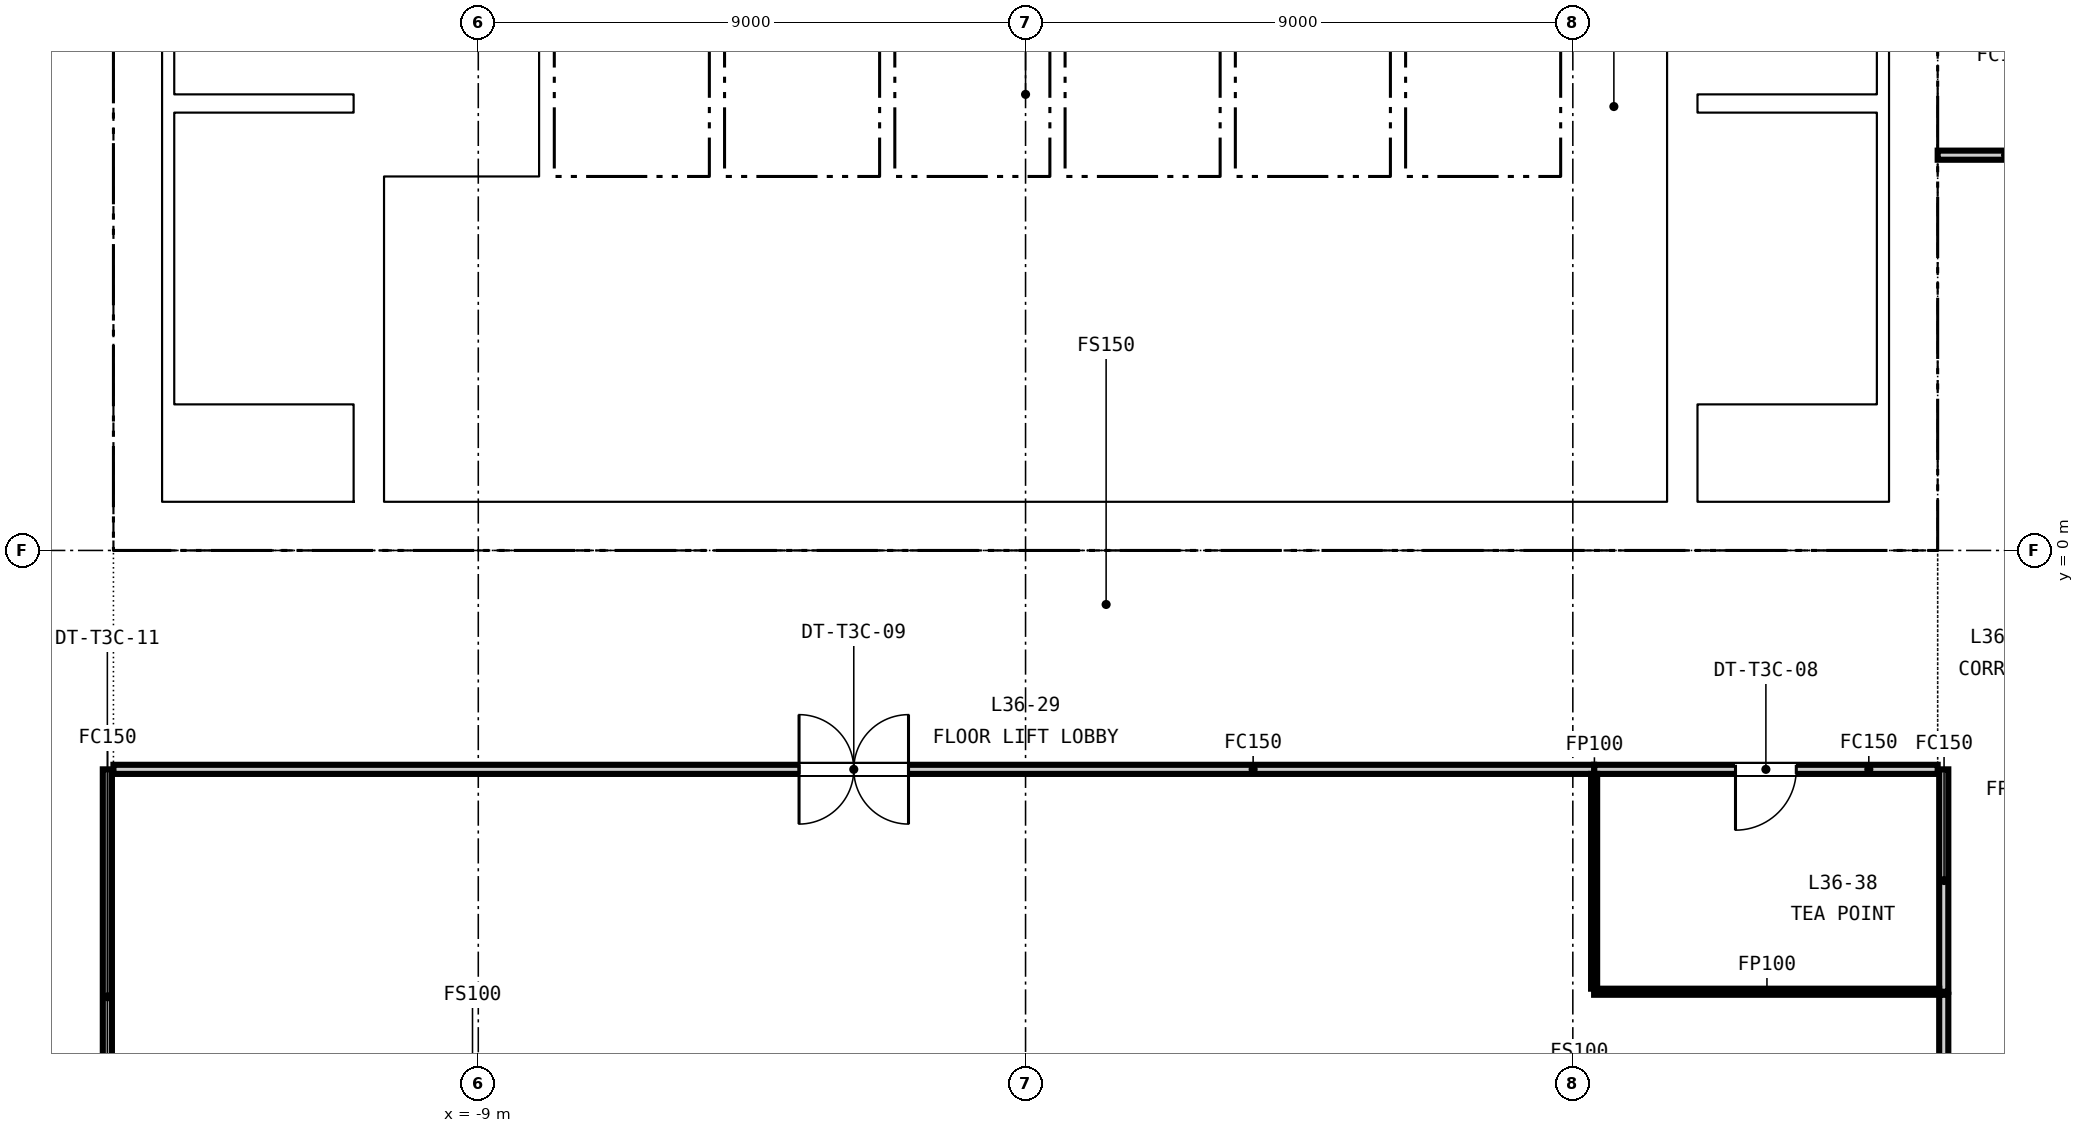
"""IFC4 building model, lengths in metres.
Left out: names, types, materials, properties, quantities, classifications, styles, units other than length and angle.
Written with IfcOpenShell. Run it as: python <this file> out.ifc"""

import sys

from ifc_helpers import new_model, si_unit, direction, frame, frame_2d, origin, place, context, subcontext, project, spatial, rectangle, extrude, element, fill, save


model = new_model("IFC4")
c1 = context("Model", 3, precision=1e-05, world=origin(), true_north=direction((0.0, 1.0)))
c2 = subcontext(c1, "Body", "Model", "MODEL_VIEW")
j1 = project(units=[si_unit("LENGTHUNIT", "METRE"), si_unit("PLANEANGLEUNIT", "RADIAN")], contexts=[c1])
p1 = place(None, origin())
s1 = spatial("IfcSite", under=j1, at=p1, CompositionType="ELEMENT")
p2 = place(p1, origin())
s2 = spatial("IfcBuilding", under=s1, at=p2, CompositionType="ELEMENT")
p3 = place(p2, frame((0.0, 0.0, 148.05)))
s3 = spatial("IfcBuildingStorey", under=s2, at=p3, CompositionType="ELEMENT", Elevation=148.05)
p4 = place(p3, frame((-15.0, 0.4, -0.15), z_axis=(0.0, 0.0, 1.0), x_axis=(1.0, 0.0, 0.0)))
e1 = element("IfcWall", 1, at=p4, inside=s3, PredefinedType="SOLIDWALL", context=c2, shape_type="SweptSolid", body=[
    extrude(rectangle(XDim=30.0, YDim=0.8, at=frame_2d((15.0, 0.0))), origin(), (0.0, 0.0, 1.0), 3.65),
])
p5 = place(p4, frame((5.8, 0.0, 0.15)))
e2 = element("IfcOpeningElement", 2, at=p5, cuts=e1, PredefinedType="OPENING", context=c2, shape_type="SweptSolid", body=[
    extrude(rectangle(XDim=2.4, YDim=2.4, at=frame_2d((1.2, 1.2))), frame((0.0, 0.41, 0.0), z_axis=(0.0, -1.0, 0.0), x_axis=(1.0, 0.0, 0.0)), (0.0, 0.0, 1.0), 0.82),
])
p6 = place(p4, frame((13.8, 0.0, 0.15)))
e3 = element("IfcOpeningElement", 3, at=p6, cuts=e1, PredefinedType="OPENING", context=c2, shape_type="SweptSolid", body=[
    extrude(rectangle(XDim=2.4, YDim=2.4, at=frame_2d((1.2, 1.2))), frame((0.0, 0.41, 0.0), z_axis=(0.0, -1.0, 0.0), x_axis=(1.0, 0.0, 0.0)), (0.0, 0.0, 1.0), 0.82),
])
p7 = place(p4, frame((21.8, 0.0, 0.15)))
e4 = element("IfcOpeningElement", 4, at=p7, cuts=e1, PredefinedType="OPENING", context=c2, shape_type="SweptSolid", body=[
    extrude(rectangle(XDim=2.4, YDim=2.4, at=frame_2d((1.2, 1.2))), frame((0.0, 0.41, 0.0), z_axis=(0.0, -1.0, 0.0), x_axis=(1.0, 0.0, 0.0)), (0.0, 0.0, 1.0), 0.82),
])
p8 = place(p4, frame((1.5, 0.0, 0.15)))
e5 = element("IfcOpeningElement", 5, at=p8, cuts=e1, PredefinedType="OPENING", context=c2, shape_type="SweptSolid", body=[
    extrude(rectangle(XDim=1.2, YDim=2.1, at=frame_2d((0.6, 1.05))), frame((0.0, 0.41, 0.0), z_axis=(0.0, -1.0, 0.0), x_axis=(1.0, 0.0, 0.0)), (0.0, 0.0, 1.0), 0.82),
])
p9 = place(p4, frame((27.3, 0.0, 0.15)))
e6 = element("IfcOpeningElement", 6, at=p9, cuts=e1, PredefinedType="OPENING", context=c2, shape_type="SweptSolid", body=[
    extrude(rectangle(XDim=1.2, YDim=2.1, at=frame_2d((0.6, 1.05))), frame((0.0, 0.41, 0.0), z_axis=(0.0, -1.0, 0.0), x_axis=(1.0, 0.0, 0.0)), (0.0, 0.0, 1.0), 0.82),
])
for number, where, z_axis, x_axis in (
    (7, (-14.6, 0.8, -0.15), (0.0, 0.0, 1.0), (0.0, 1.0, 0.0)),
    (8, (14.6, 0.8, -0.15), (0.0, 0.0, 1.0), (0.0, 1.0, 0.0)),
):
    element("IfcWall", number, at=place(p3, frame(where, z_axis=z_axis, x_axis=x_axis)), inside=s3, PredefinedType="SOLIDWALL", context=c2, shape_type="SweptSolid", body=[
        extrude(rectangle(XDim=13.4, YDim=0.8, at=frame_2d((6.7, 0.0))), origin(), (0.0, 0.0, 1.0), 3.65),
    ])
for number, where, z_axis, x_axis in (
    (9, (-10.8, 0.8, -0.15), (0.0, 0.0, 1.0), (0.0, 1.0, 0.0)),
    (10, (10.8, 0.8, -0.15), (0.0, 0.0, 1.0), (0.0, 1.0, 0.0)),
):
    element("IfcWall", number, at=place(p3, frame(where, z_axis=z_axis, x_axis=x_axis)), inside=s3, PredefinedType="SOLIDWALL", context=c2, shape_type="SweptSolid", body=[
        extrude(rectangle(XDim=13.4, YDim=0.5, at=frame_2d((6.7, 0.0))), origin(), (0.0, 0.0, 1.0), 3.65),
    ])
p10 = place(p3, frame((-10.55, 3.5, 0.0), z_axis=(0.0, 0.0, 1.0), x_axis=(1.0, 0.0, 0.0)))
e11 = element("IfcWall", 11, at=p10, inside=s3, PredefinedType="PARTITIONING", context=c2, shape_type="SweptSolid", body=[
    extrude(rectangle(XDim=21.1, YDim=0.2, at=frame_2d((10.55, 0.0))), origin(), (0.0, 0.0, 1.0), 3.5),
])
p11 = place(p10, frame((2.312, 0.0, 0.0)))
e12 = element("IfcOpeningElement", 12, at=p11, cuts=e11, PredefinedType="OPENING", context=c2, shape_type="SweptSolid", body=[
    extrude(rectangle(XDim=1.0, YDim=2.1, at=frame_2d((0.5, 1.05))), frame((0.0, 0.11, 0.0), z_axis=(0.0, -1.0, 0.0), x_axis=(1.0, 0.0, 0.0)), (0.0, 0.0, 1.0), 0.22),
])
p12 = place(p10, frame((7.05, 0.0, 0.0)))
e13 = element("IfcOpeningElement", 13, at=p12, cuts=e11, PredefinedType="OPENING", context=c2, shape_type="SweptSolid", body=[
    extrude(rectangle(XDim=1.0, YDim=2.1, at=frame_2d((0.5, 1.05))), frame((0.0, 0.11, 0.0), z_axis=(0.0, -1.0, 0.0), x_axis=(1.0, 0.0, 0.0)), (0.0, 0.0, 1.0), 0.22),
])
p13 = place(p10, frame((10.175, 0.0, 0.0)))
e14 = element("IfcOpeningElement", 14, at=p13, cuts=e11, PredefinedType="OPENING", context=c2, shape_type="SweptSolid", body=[
    extrude(rectangle(XDim=1.0, YDim=2.1, at=frame_2d((0.5, 1.05))), frame((0.0, 0.11, 0.0), z_axis=(0.0, -1.0, 0.0), x_axis=(1.0, 0.0, 0.0)), (0.0, 0.0, 1.0), 0.22),
])
p14 = place(p10, frame((14.05, 0.0, 0.0)))
e15 = element("IfcOpeningElement", 15, at=p14, cuts=e11, PredefinedType="OPENING", context=c2, shape_type="SweptSolid", body=[
    extrude(rectangle(XDim=1.0, YDim=2.1, at=frame_2d((0.5, 1.05))), frame((0.0, 0.11, 0.0), z_axis=(0.0, -1.0, 0.0), x_axis=(1.0, 0.0, 0.0)), (0.0, 0.0, 1.0), 0.22),
])
p15 = place(p10, frame((17.837, 0.0, 0.0)))
e16 = element("IfcOpeningElement", 16, at=p15, cuts=e11, PredefinedType="OPENING", context=c2, shape_type="SweptSolid", body=[
    extrude(rectangle(XDim=0.9, YDim=2.1, at=frame_2d((0.45, 1.05))), frame((0.0, 0.11, 0.0), z_axis=(0.0, -1.0, 0.0), x_axis=(1.0, 0.0, 0.0)), (0.0, 0.0, 1.0), 0.22),
])
p16 = place(p10, frame((19.9, 0.0, 0.0)))
e17 = element("IfcOpeningElement", 17, at=p16, cuts=e11, PredefinedType="OPENING", context=c2, shape_type="SweptSolid", body=[
    extrude(rectangle(XDim=0.9, YDim=2.1, at=frame_2d((0.45, 1.05))), frame((0.0, 0.11, 0.0), z_axis=(0.0, -1.0, 0.0), x_axis=(1.0, 0.0, 0.0)), (0.0, 0.0, 1.0), 0.22),
])
p17 = place(p3, frame((-10.55, 6.025, 0.0), z_axis=(0.0, 0.0, 1.0), x_axis=(1.0, 0.0, 0.0)))
e18 = element("IfcWall", 18, at=p17, inside=s3, PredefinedType="PARTITIONING", context=c2, shape_type="SweptSolid", body=[
    extrude(rectangle(XDim=21.1, YDim=0.25, at=frame_2d((10.55, 0.0))), origin(), (0.0, 0.0, 1.0), 3.5),
])
for number, where, z_axis, x_axis in (
    (19, (-4.85, 3.6, 0.0), (0.0, 0.0, 1.0), (0.0, 1.0, 0.0)),
    (20, (-1.15, 3.6, 0.0), (0.0, 0.0, 1.0), (0.0, 1.0, 0.0)),
    (21, (1.4, 3.6, 0.0), (0.0, 0.0, 1.0), (0.0, 1.0, 0.0)),
    (22, (6.6, 3.6, 0.0), (0.0, 0.0, 1.0), (0.0, 1.0, 0.0)),
):
    element("IfcWall", number, at=place(p3, frame(where, z_axis=z_axis, x_axis=x_axis)), inside=s3, PredefinedType="PARTITIONING", context=c2, shape_type="SweptSolid", body=[
        extrude(rectangle(XDim=2.3, YDim=0.15, at=frame_2d((1.15, 0.0))), origin(), (0.0, 0.0, 1.0), 3.5),
    ])
p18 = place(p3, frame((8.925, 3.6, 0.0), z_axis=(0.0, 0.0, 1.0), x_axis=(0.0, 1.0, 0.0)))
e23 = element("IfcWall", 23, at=p18, inside=s3, PredefinedType="PARTITIONING", context=c2, shape_type="SweptSolid", body=[
    extrude(rectangle(XDim=2.3, YDim=0.25, at=frame_2d((1.15, 0.0))), origin(), (0.0, 0.0, 1.0), 3.5),
])
for number, where, z_axis, x_axis in (
    (24, (-7.875, 6.15, 0.0), (0.0, 0.0, 1.0), (0.0, 1.0, 0.0)),
    (25, (-5.075, 6.15, 0.0), (0.0, 0.0, 1.0), (0.0, 1.0, 0.0)),
    (26, (-2.275, 6.15, 0.0), (0.0, 0.0, 1.0), (0.0, 1.0, 0.0)),
    (27, (0.525, 6.15, 0.0), (0.0, 0.0, 1.0), (0.0, 1.0, 0.0)),
    (28, (3.325, 6.15, 0.0), (0.0, 0.0, 1.0), (0.0, 1.0, 0.0)),
    (29, (6.125, 6.15, 0.0), (0.0, 0.0, 1.0), (0.0, 1.0, 0.0)),
    (30, (8.925, 6.15, 0.0), (0.0, 0.0, 1.0), (0.0, 1.0, 0.0)),
):
    element("IfcWall", number, at=place(p3, frame(where, z_axis=z_axis, x_axis=x_axis)), inside=s3, PredefinedType="PARTITIONING", context=c2, shape_type="SweptSolid", body=[
        extrude(rectangle(XDim=2.3, YDim=0.25, at=frame_2d((1.15, 0.0))), origin(), (0.0, 0.0, 1.0), 3.5),
    ])
p19 = place(p3, frame((-14.0, 7.35, 0.0), z_axis=(0.0, 0.0, 1.0), x_axis=(1.0, 0.0, 0.0)))
e31 = element("IfcWall", 31, at=p19, inside=s3, PredefinedType="SOLIDWALL", context=c2, shape_type="SweptSolid", body=[
    extrude(rectangle(XDim=2.95, YDim=0.3, at=frame_2d((1.475, 0.0))), origin(), (0.0, 0.0, 1.0), 3.5),
])
p20 = place(p3, frame((-14.1, 0.8, 0.0), z_axis=(0.0, 0.0, 1.0), x_axis=(0.0, 1.0, 0.0)))
e32 = element("IfcWall", 32, at=p20, inside=s3, PredefinedType="SOLIDWALL", context=c2, shape_type="SweptSolid", body=[
    extrude(rectangle(XDim=13.4, YDim=0.2, at=frame_2d((6.7, 0.0))), origin(), (0.0, 0.0, 1.0), 3.5),
])
p21 = place(p3, frame((11.05, 7.35, 0.0), z_axis=(0.0, 0.0, 1.0), x_axis=(1.0, 0.0, 0.0)))
e33 = element("IfcWall", 33, at=p21, inside=s3, PredefinedType="SOLIDWALL", context=c2, shape_type="SweptSolid", body=[
    extrude(rectangle(XDim=2.95, YDim=0.3, at=frame_2d((1.475, 0.0))), origin(), (0.0, 0.0, 1.0), 3.5),
])
p22 = place(p3, frame((14.1, 0.8, 0.0), z_axis=(0.0, 0.0, 1.0), x_axis=(0.0, 1.0, 0.0)))
e34 = element("IfcWall", 34, at=p22, inside=s3, PredefinedType="SOLIDWALL", context=c2, shape_type="SweptSolid", body=[
    extrude(rectangle(XDim=13.4, YDim=0.2, at=frame_2d((6.7, 0.0))), origin(), (0.0, 0.0, 1.0), 3.5),
])
p23 = place(p3, frame((15.0, -3.6, 0.0), z_axis=(0.0, 0.0, 1.0), x_axis=(-1.0, 0.0, 0.0)))
e35 = element("IfcWall", 35, at=p23, inside=s3, PredefinedType="PARTITIONING", context=c2, shape_type="SweptSolid", body=[
    extrude(rectangle(XDim=5.65, YDim=0.15, at=frame_2d((2.825, 0.0))), origin(), (0.0, 0.0, 1.0), 2.741),
])
p24 = place(p23, frame((2.325, 0.0, 0.0)))
e36 = element("IfcOpeningElement", 36, at=p24, cuts=e35, PredefinedType="OPENING", context=c2, shape_type="SweptSolid", body=[
    extrude(rectangle(XDim=1.0, YDim=2.1, at=frame_2d((0.5, 1.05))), frame((0.0, 0.085, 0.0), z_axis=(0.0, -1.0, 0.0), x_axis=(1.0, 0.0, 0.0)), (0.0, 0.0, 1.0), 0.17),
])
p25 = place(p3, frame((9.35, -3.6, 0.0), z_axis=(0.0, 0.0, 1.0), x_axis=(-1.0, 0.0, 0.0)))
e37 = element("IfcWall", 37, at=p25, inside=s3, PredefinedType="PARTITIONING", context=c2, shape_type="SweptSolid", body=[
    extrude(rectangle(XDim=24.35, YDim=0.15, at=frame_2d((12.175, 0.0))), origin(), (0.0, 0.0, 1.0), 2.741),
])
p26 = place(p25, frame((11.275, 0.0, 0.0)))
e38 = element("IfcOpeningElement", 38, at=p26, cuts=e37, PredefinedType="OPENING", context=c2, shape_type="SweptSolid", body=[
    extrude(rectangle(XDim=1.8, YDim=2.1, at=frame_2d((0.9, 1.05))), frame((0.0, 0.085, 0.0), z_axis=(0.0, -1.0, 0.0), x_axis=(1.0, 0.0, 0.0)), (0.0, 0.0, 1.0), 0.17),
])
p27 = place(p3, frame((-15.1, -3.6, 0.0), z_axis=(0.0, 0.0, 1.0), x_axis=(0.0, -1.0, 0.0)))
e39 = element("IfcWall", 39, at=p27, inside=s3, PredefinedType="PARTITIONING", context=c2, shape_type="SweptSolid", body=[
    extrude(rectangle(XDim=7.48, YDim=0.15, at=frame_2d((3.74, 0.0))), origin(), (0.0, 0.0, 1.0), 2.741),
])
p28 = place(p3, frame((15.0, 6.5, 0.0), z_axis=(0.0, 0.0, 1.0), x_axis=(1.0, 0.0, 0.0)))
e40 = element("IfcWall", 40, at=p28, inside=s3, PredefinedType="PARTITIONING", context=c2, shape_type="SweptSolid", body=[
    extrude(rectangle(XDim=2.223, YDim=0.15, at=frame_2d((1.111, 0.0))), origin(), (0.0, 0.0, 1.0), 2.741),
])
p29 = place(p3, frame((15.1, -7.257, 0.0), z_axis=(0.0, 0.0, 1.0), x_axis=(0.0, 1.0, 0.0)))
e41 = element("IfcWall", 41, at=p29, inside=s3, PredefinedType="PARTITIONING", context=c2, shape_type="SweptSolid", body=[
    extrude(rectangle(XDim=3.657, YDim=0.15, at=frame_2d((1.829, 0.0))), origin(), (0.0, 0.0, 1.0), 2.741),
])
p30 = place(p3, frame((9.35, -7.257, 0.0), z_axis=(0.0, 0.0, 1.0), x_axis=(1.0, 0.0, 0.0)))
e42 = element("IfcWall", 42, at=p30, inside=s3, PredefinedType="PARTITIONING", context=c2, shape_type="SweptSolid", body=[
    extrude(rectangle(XDim=5.675, YDim=0.1, at=frame_2d((2.837, 0.0))), origin(), (0.0, 0.0, 1.0), 2.741),
])
p31 = place(p3, frame((15.1, -15.525, 0.0), z_axis=(0.0, 0.0, 1.0), x_axis=(0.0, 1.0, 0.0)))
e43 = element("IfcWall", 43, at=p31, inside=s3, PredefinedType="PARTITIONING", context=c2, shape_type="SweptSolid", body=[
    extrude(rectangle(XDim=8.218, YDim=0.15, at=frame_2d((4.109, 0.0))), origin(), (0.0, 0.0, 1.0), 2.741),
])
p32 = place(p3, frame((9.35, -7.207, 0.0), z_axis=(0.0, 0.0, 1.0), x_axis=(0.0, 1.0, 0.0)))
e44 = element("IfcWall", 44, at=p32, inside=s3, PredefinedType="PARTITIONING", context=c2, shape_type="SweptSolid", body=[
    extrude(rectangle(XDim=3.532, YDim=0.1, at=frame_2d((1.766, 0.0))), origin(), (0.0, 0.0, 1.0), 2.741),
])
p33 = place(p11, origin())
e45 = element("IfcDoor", 45, at=p33, inside=s3, OperationType="SINGLE_SWING_LEFT", PredefinedType="DOOR", context=c2, shape_type="SweptSolid", body=[
    extrude(rectangle(XDim=1.0, YDim=2.1, at=frame_2d((0.5, 1.05))), frame((0.0, 0.025, 0.0), z_axis=(0.0, -1.0, 0.0), x_axis=(1.0, 0.0, 0.0)), (0.0, 0.0, 1.0), 0.05),
])
fill(e12, e45)
p34 = place(p12, origin())
e46 = element("IfcDoor", 46, at=p34, inside=s3, OperationType="SINGLE_SWING_RIGHT", PredefinedType="DOOR", context=c2, shape_type="SweptSolid", body=[
    extrude(rectangle(XDim=1.0, YDim=2.1, at=frame_2d((0.5, 1.05))), frame((0.0, 0.025, 0.0), z_axis=(0.0, -1.0, 0.0), x_axis=(1.0, 0.0, 0.0)), (0.0, 0.0, 1.0), 0.05),
])
fill(e13, e46)
p35 = place(p13, origin())
e47 = element("IfcDoor", 47, at=p35, inside=s3, OperationType="SINGLE_SWING_LEFT", PredefinedType="DOOR", context=c2, shape_type="SweptSolid", body=[
    extrude(rectangle(XDim=1.0, YDim=2.1, at=frame_2d((0.5, 1.05))), frame((0.0, 0.025, 0.0), z_axis=(0.0, -1.0, 0.0), x_axis=(1.0, 0.0, 0.0)), (0.0, 0.0, 1.0), 0.05),
])
fill(e14, e47)
p36 = place(p14, origin())
e48 = element("IfcDoor", 48, at=p36, inside=s3, OperationType="SINGLE_SWING_RIGHT", PredefinedType="DOOR", context=c2, shape_type="SweptSolid", body=[
    extrude(rectangle(XDim=1.0, YDim=2.1, at=frame_2d((0.5, 1.05))), frame((0.0, 0.025, 0.0), z_axis=(0.0, -1.0, 0.0), x_axis=(1.0, 0.0, 0.0)), (0.0, 0.0, 1.0), 0.05),
])
fill(e15, e48)
p37 = place(p15, origin())
e49 = element("IfcDoor", 49, at=p37, inside=s3, OperationType="SINGLE_SWING_LEFT", PredefinedType="DOOR", context=c2, shape_type="SweptSolid", body=[
    extrude(rectangle(XDim=0.9, YDim=2.1, at=frame_2d((0.45, 1.05))), frame((0.0, 0.025, 0.0), z_axis=(0.0, -1.0, 0.0), x_axis=(1.0, 0.0, 0.0)), (0.0, 0.0, 1.0), 0.05),
])
fill(e16, e49)
p38 = place(p16, origin())
e50 = element("IfcDoor", 50, at=p38, inside=s3, OperationType="SINGLE_SWING_RIGHT", PredefinedType="DOOR", context=c2, shape_type="SweptSolid", body=[
    extrude(rectangle(XDim=0.9, YDim=2.1, at=frame_2d((0.45, 1.05))), frame((0.0, 0.025, 0.0), z_axis=(0.0, -1.0, 0.0), x_axis=(1.0, 0.0, 0.0)), (0.0, 0.0, 1.0), 0.05),
])
fill(e17, e50)
p39 = place(p5, origin())
e51 = element("IfcDoor", 51, at=p39, inside=s3, OperationType="DOUBLE_DOOR_DOUBLE_SWING", PredefinedType="DOOR", context=c2, shape_type="SweptSolid", body=[
    extrude(rectangle(XDim=2.4, YDim=2.4, at=frame_2d((1.2, 1.2))), frame((0.0, 0.025, 0.0), z_axis=(0.0, -1.0, 0.0), x_axis=(1.0, 0.0, 0.0)), (0.0, 0.0, 1.0), 0.05),
])
fill(e2, e51)
p40 = place(p6, origin())
e52 = element("IfcDoor", 52, at=p40, inside=s3, OperationType="DOUBLE_DOOR_DOUBLE_SWING", PredefinedType="DOOR", context=c2, shape_type="SweptSolid", body=[
    extrude(rectangle(XDim=2.4, YDim=2.4, at=frame_2d((1.2, 1.2))), frame((0.0, 0.025, 0.0), z_axis=(0.0, -1.0, 0.0), x_axis=(1.0, 0.0, 0.0)), (0.0, 0.0, 1.0), 0.05),
])
fill(e3, e52)
p41 = place(p7, origin())
e53 = element("IfcDoor", 53, at=p41, inside=s3, OperationType="DOUBLE_DOOR_DOUBLE_SWING", PredefinedType="DOOR", context=c2, shape_type="SweptSolid", body=[
    extrude(rectangle(XDim=2.4, YDim=2.4, at=frame_2d((1.2, 1.2))), frame((0.0, 0.025, 0.0), z_axis=(0.0, -1.0, 0.0), x_axis=(1.0, 0.0, 0.0)), (0.0, 0.0, 1.0), 0.05),
])
fill(e4, e53)
p42 = place(p8, origin())
e54 = element("IfcDoor", 54, at=p42, inside=s3, OperationType="SINGLE_SWING_LEFT", PredefinedType="DOOR", context=c2, shape_type="SweptSolid", body=[
    extrude(rectangle(XDim=1.2, YDim=2.1, at=frame_2d((0.6, 1.05))), frame((0.0, 0.025, 0.0), z_axis=(0.0, -1.0, 0.0), x_axis=(1.0, 0.0, 0.0)), (0.0, 0.0, 1.0), 0.05),
])
fill(e5, e54)
p43 = place(p9, origin())
e55 = element("IfcDoor", 55, at=p43, inside=s3, OperationType="SINGLE_SWING_RIGHT", PredefinedType="DOOR", context=c2, shape_type="SweptSolid", body=[
    extrude(rectangle(XDim=1.2, YDim=2.1, at=frame_2d((0.6, 1.05))), frame((0.0, 0.025, 0.0), z_axis=(0.0, -1.0, 0.0), x_axis=(1.0, 0.0, 0.0)), (0.0, 0.0, 1.0), 0.05),
])
fill(e6, e55)
p44 = place(p24, origin())
e56 = element("IfcDoor", 56, at=p44, inside=s3, OperationType="SINGLE_SWING_RIGHT", PredefinedType="DOOR", context=c2, shape_type="SweptSolid", body=[
    extrude(rectangle(XDim=1.0, YDim=2.1, at=frame_2d((0.5, 1.05))), frame((0.0, 0.025, 0.0), z_axis=(0.0, -1.0, 0.0), x_axis=(1.0, 0.0, 0.0)), (0.0, 0.0, 1.0), 0.05),
])
fill(e36, e56)
p45 = place(p26, origin())
e57 = element("IfcDoor", 57, at=p45, inside=s3, OperationType="DOUBLE_DOOR_DOUBLE_SWING", PredefinedType="DOOR", context=c2, shape_type="SweptSolid", body=[
    extrude(rectangle(XDim=1.8, YDim=2.1, at=frame_2d((0.9, 1.05))), frame((0.0, 0.025, 0.0), z_axis=(0.0, -1.0, 0.0), x_axis=(1.0, 0.0, 0.0)), (0.0, 0.0, 1.0), 0.05),
])
fill(e38, e57)
save(model, sys.argv[1])
